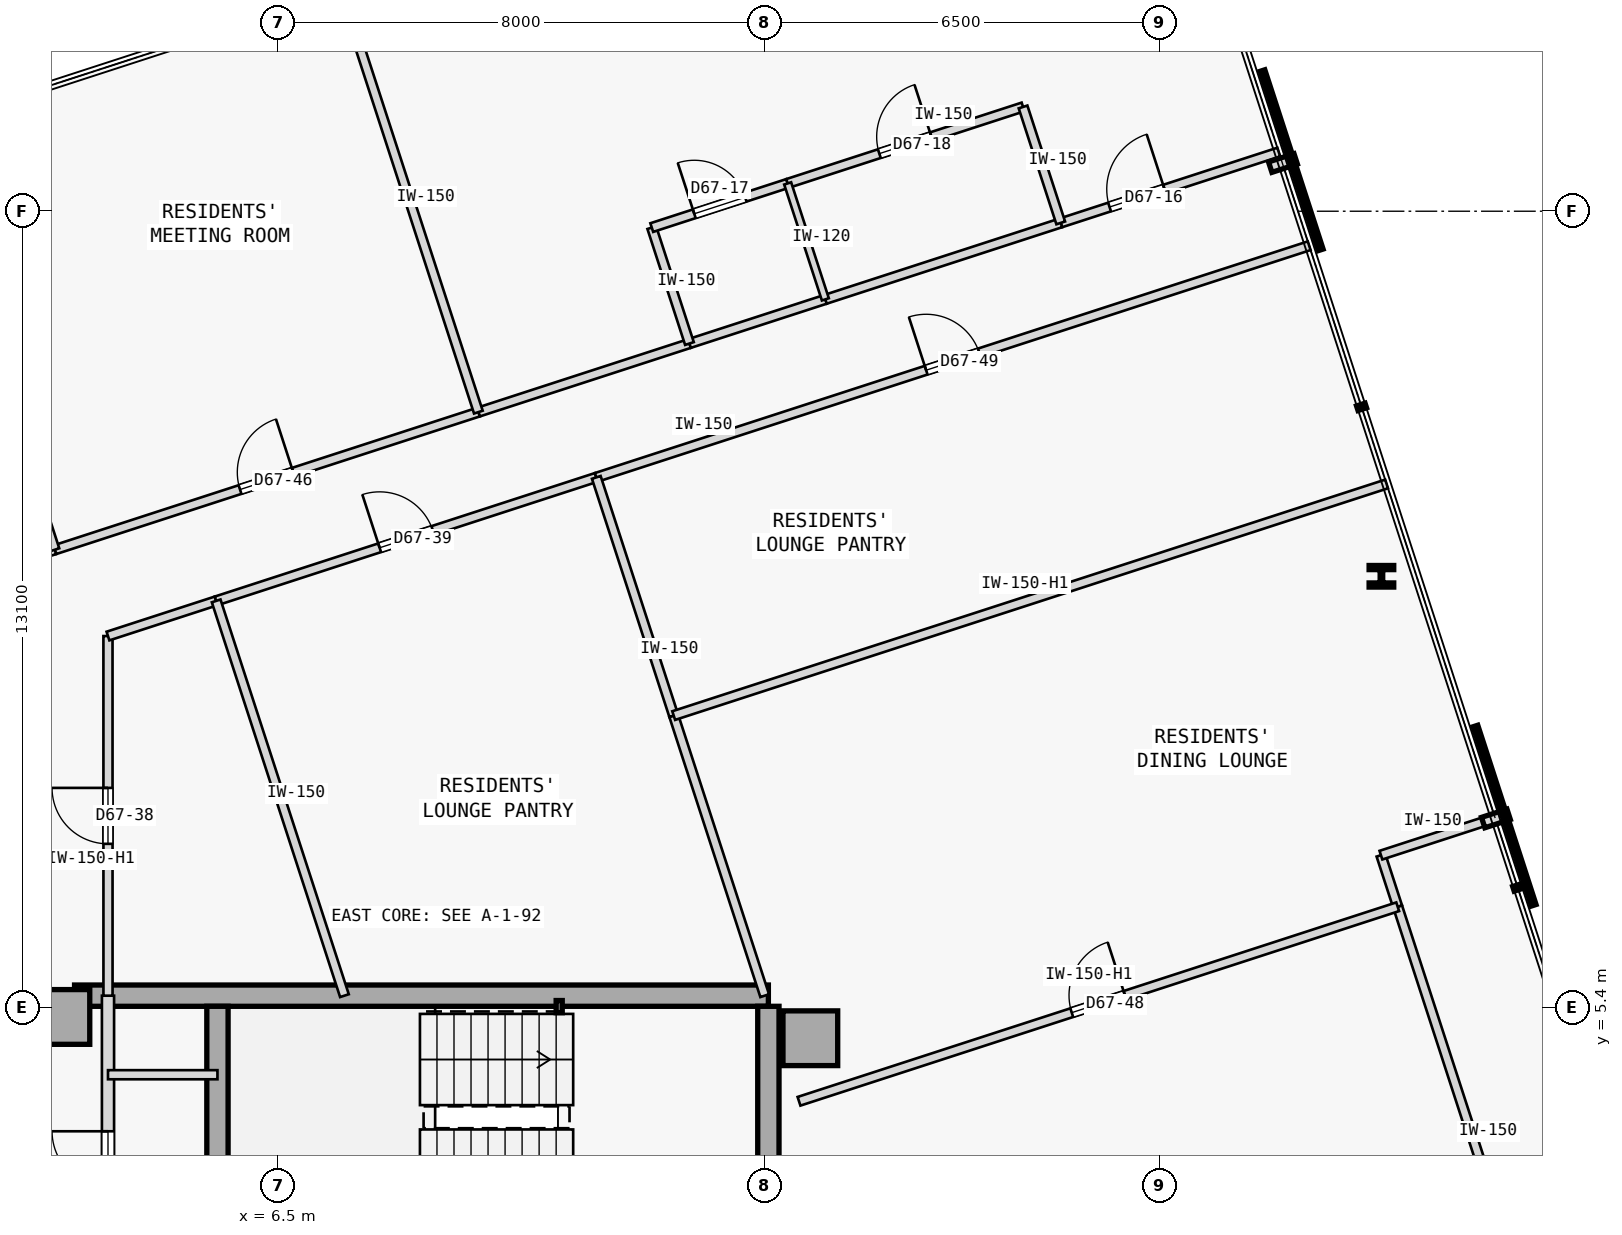
"""IFC4 building model, lengths in metres.
Left out: names, types, materials, properties, quantities, classifications, styles, units other than length and angle.
Written with IfcOpenShell. Run it as: python <this file> out.ifc"""

import sys

from ifc_helpers import new_model, si_unit, direction, frame, frame_2d, origin, origin_2d, place, context, subcontext, project, spatial, rectangle, hollow_rectangle, i_section, extrude, element, fill, save


model = new_model("IFC4")
c1 = context("Model", 3, precision=1e-05, world=origin(), true_north=direction((0.0, 1.0)))
c2 = subcontext(c1, "Body", "Model", "MODEL_VIEW")
j1 = project(units=[si_unit("LENGTHUNIT", "METRE"), si_unit("PLANEANGLEUNIT", "RADIAN")], contexts=[c1])
p1 = place(None, origin())
s1 = spatial("IfcSite", under=j1, at=p1, CompositionType="ELEMENT")
p2 = place(p1, origin())
s2 = spatial("IfcBuilding", under=s1, at=p2, CompositionType="ELEMENT")
p3 = place(p2, frame((0.0, 0.0, 251.1)))
s3 = spatial("IfcBuildingStorey", under=s2, at=p3, CompositionType="ELEMENT", Elevation=251.1)
for number, where, z_axis, x_axis in (
    (1, (15.25, 4.9, 0.0), (0.0, 0.0, 1.0), (1.0, 0.0, 0.0)),
    (2, (2.95, 5.25, 0.0), (0.0, 0.0, 1.0), (1.0, 0.0, 0.0)),
):
    element("IfcColumn", number, at=place(p3, frame(where, z_axis=z_axis, x_axis=x_axis)), inside=s3, PredefinedType="COLUMN", context=c2, shape_type="SweptSolid", body=[
        extrude(rectangle(XDim=0.9, YDim=0.9, at=origin_2d()), origin(), (0.0, 0.0, 1.0), 3.35),
    ])
p4 = place(p3, frame((3.15, 5.6, 0.0), z_axis=(0.0, 0.0, 1.0), x_axis=(1.0, 0.0, 0.0)))
e3 = element("IfcWall", 3, at=p4, inside=s3, PredefinedType="SHEAR", context=c2, shape_type="SweptSolid", body=[
    extrude(rectangle(XDim=11.41, YDim=0.35, at=frame_2d((5.705, 0.0))), origin(), (0.0, 0.0, 1.0), 2.95),
])
p5 = place(p3, frame((14.56, -5.425, 0.0), z_axis=(0.0, 0.0, 1.0), x_axis=(0.0, 1.0, 0.0)))
e4 = element("IfcWall", 4, at=p5, inside=s3, PredefinedType="SHEAR", context=c2, shape_type="SweptSolid", body=[
    extrude(rectangle(XDim=10.85, YDim=0.35, at=frame_2d((5.425, 0.0))), origin(), (0.0, 0.0, 1.0), 2.95),
])
p6 = place(p3, frame((5.5, 2.15, 0.0), z_axis=(0.0, 0.0, 1.0), x_axis=(0.0, 1.0, 0.0)))
e5 = element("IfcWall", 5, at=p6, inside=s3, PredefinedType="SHEAR", context=c2, shape_type="SweptSolid", body=[
    extrude(rectangle(XDim=3.275, YDim=0.35, at=frame_2d((1.638, 0.0))), origin(), (0.0, 0.0, 1.0), 2.95),
])
p7 = place(p3, frame((11.12, 5.42, 0.0), z_axis=(0.0, 0.0, 1.0), x_axis=(1.0, 0.0, 0.0)))
e6 = element("IfcColumn", 6, at=p7, inside=s3, PredefinedType="COLUMN", context=c2, shape_type="SweptSolid", body=[
    extrude(hollow_rectangle(XDim=0.1, YDim=0.2, WallThickness=0.008, at=origin_2d()), origin(), (0.0, 0.0, 1.0), 3.35),
])
p8 = place(p3, frame((24.642, 12.497, 0.0), z_axis=(0.0, 0.0, 1.0), x_axis=(1.0, 0.0, 0.0)))
e7 = element("IfcColumn", 7, at=p8, inside=s3, PredefinedType="COLUMN", context=c2, shape_type="SweptSolid", body=[
    extrude(i_section(OverallWidth=0.405, OverallDepth=0.355, WebThickness=0.042, FlangeThickness=0.068, FilletRadius=0.015, at=origin_2d()), origin(), (0.0, 0.0, 1.0), 3.35),
])
p9 = place(p3, frame((3.7, -1.15, 0.0), z_axis=(0.0, 0.0, 1.0), x_axis=(0.0, 1.0, 0.0)))
e8 = element("IfcWall", 8, at=p9, inside=s3, PredefinedType="STANDARD", context=c2, shape_type="SweptSolid", body=[
    extrude(rectangle(XDim=6.75, YDim=0.2, at=frame_2d((3.375, 0.0))), origin(), (0.0, 0.0, 1.0), 2.95),
])
p10 = place(p9, frame((3.6, 0.0, 0.0)))
e9 = element("IfcOpeningElement", 9, at=p10, cuts=e8, PredefinedType="OPENING", context=c2, shape_type="SweptSolid", body=[
    extrude(rectangle(XDim=0.92, YDim=2.15, at=frame_2d((0.46, 1.075))), frame((0.0, 0.11, 0.0), z_axis=(0.0, -1.0, 0.0), x_axis=(1.0, 0.0, 0.0)), (0.0, 0.0, 1.0), 0.22),
])
p11 = place(p9, frame((0.85, 0.0, 0.0)))
e10 = element("IfcOpeningElement", 10, at=p11, cuts=e8, PredefinedType="OPENING", context=c2, shape_type="SweptSolid", body=[
    extrude(rectangle(XDim=0.9, YDim=2.15, at=frame_2d((0.45, 1.075))), frame((0.0, 0.11, 0.0), z_axis=(0.0, -1.0, 0.0), x_axis=(1.0, 0.0, 0.0)), (0.0, 0.0, 1.0), 0.22),
])
p12 = place(p3, frame((3.7, 4.3, 0.0), z_axis=(0.0, 0.0, 1.0), x_axis=(1.0, 0.0, 0.0)))
e11 = element("IfcWall", 11, at=p12, inside=s3, PredefinedType="PARTITIONING", context=c2, shape_type="SweptSolid", body=[
    extrude(rectangle(XDim=1.8, YDim=0.15, at=frame_2d((0.9, 0.0))), origin(), (0.0, 0.0, 1.0), 2.95),
])
p13 = place(p3, frame((9.791, 15.196, 0.0), z_axis=(0.0, 0.0, 1.0), x_axis=(0.951050780541, 0.309034646652, 0.0)))
e12 = element("IfcWall", 12, at=p13, inside=s3, PredefinedType="PARTITIONING", context=c2, shape_type="SweptSolid", body=[
    extrude(rectangle(XDim=3.65, YDim=0.15, at=frame_2d((1.825, 0.0))), origin(), (0.0, 0.0, 1.0), 2.95),
])
p14 = place(p3, frame((19.368, 18.308, 0.0), z_axis=(0.0, 0.0, 1.0), x_axis=(0.951052151329, 0.309030428036, 0.0)))
e13 = element("IfcWall", 13, at=p14, inside=s3, PredefinedType="PARTITIONING", context=c2, shape_type="SweptSolid", body=[
    extrude(rectangle(XDim=3.77, YDim=0.15, at=frame_2d((1.885, 0.0))), origin(), (0.0, 0.0, 1.0), 2.95),
])
p15 = place(p14, frame((0.844, 0.0, 0.0)))
e14 = element("IfcOpeningElement", 14, at=p15, cuts=e13, PredefinedType="OPENING", context=c2, shape_type="SweptSolid", body=[
    extrude(rectangle(XDim=0.95, YDim=2.15, at=frame_2d((0.475, 1.075))), frame((0.0, 0.085, 0.0), z_axis=(0.0, -1.0, 0.0), x_axis=(1.0, 0.0, 0.0)), (0.0, 0.0, 1.0), 0.17),
])
p16 = place(p3, frame((13.262, 16.324, 0.0), z_axis=(0.0, 0.0, 1.0), x_axis=(0.951045519245, 0.309050837767, 0.0)))
e15 = element("IfcWall", 15, at=p16, inside=s3, PredefinedType="PARTITIONING", context=c2, shape_type="SweptSolid", body=[
    extrude(rectangle(XDim=2.35, YDim=0.15, at=frame_2d((1.175, 0.0))), origin(), (0.0, 0.0, 1.0), 2.95),
])
p17 = place(p3, frame((15.497, 17.051, 0.0), z_axis=(0.0, 0.0, 1.0), x_axis=(0.951067124726, 0.308984343076, 0.0)))
e16 = element("IfcWall", 16, at=p17, inside=s3, PredefinedType="PARTITIONING", context=c2, shape_type="SweptSolid", body=[
    extrude(rectangle(XDim=4.07, YDim=0.15, at=frame_2d((2.035, 0.0))), origin(), (0.0, 0.0, 1.0), 2.95),
])
p18 = place(p3, frame((3.7, 5.6, 0.0), z_axis=(0.0, 0.0, 1.0), x_axis=(-0.000123839008, 0.999999992332, 0.0)))
e17 = element("IfcWall", 17, at=p18, inside=s3, PredefinedType="PARTITIONING", context=c2, shape_type="SweptSolid", body=[
    extrude(rectangle(XDim=5.914, YDim=0.15, at=frame_2d((2.957, 0.0))), origin(), (0.0, 0.0, 1.0), 2.5),
])
p19 = place(p18, frame((2.497, 0.0, 0.0)))
e18 = element("IfcOpeningElement", 18, at=p19, cuts=e17, PredefinedType="OPENING", context=c2, shape_type="SweptSolid", body=[
    extrude(rectangle(XDim=0.92, YDim=2.15, at=frame_2d((0.46, 1.075))), frame((0.0, 0.085, 0.0), z_axis=(0.0, -1.0, 0.0), x_axis=(1.0, 0.0, 0.0)), (0.0, 0.0, 1.0), 0.17),
])
p20 = place(p3, frame((3.699, 11.514, 0.0), z_axis=(0.0, 0.0, 1.0), x_axis=(0.951069540665, 0.308976906612, 0.0)))
e19 = element("IfcWall", 19, at=p20, inside=s3, PredefinedType="PARTITIONING", context=c2, shape_type="SweptSolid", body=[
    extrude(rectangle(XDim=1.871, YDim=0.15, at=frame_2d((0.936, 0.0))), origin(), (0.0, 0.0, 1.0), 2.95),
])
p21 = place(p3, frame((5.479, 12.092, 0.0), z_axis=(0.0, 0.0, 1.0), x_axis=(0.951051809397, 0.309031480343, 0.0)))
e20 = element("IfcWall", 20, at=p21, inside=s3, PredefinedType="PARTITIONING", context=c2, shape_type="SweptSolid", body=[
    extrude(rectangle(XDim=6.573, YDim=0.15, at=frame_2d((3.287, 0.0))), origin(), (0.0, 0.0, 1.0), 2.95),
])
p22 = place(p21, frame((2.826, 0.0, 0.0)))
e21 = element("IfcOpeningElement", 21, at=p22, cuts=e20, PredefinedType="OPENING", context=c2, shape_type="SweptSolid", body=[
    extrude(rectangle(XDim=0.92, YDim=2.15, at=frame_2d((0.46, 1.075))), frame((0.0, 0.085, 0.0), z_axis=(0.0, -1.0, 0.0), x_axis=(1.0, 0.0, 0.0)), (0.0, 0.0, 1.0), 0.17),
])
p23 = place(p3, frame((-1.089, 11.661, 0.0), z_axis=(0.0, 0.0, 1.0), x_axis=(0.951057158344, 0.309015018346, 0.0)))
e22 = element("IfcWall", 22, at=p23, inside=s3, PredefinedType="PARTITIONING", context=c2, shape_type="SweptSolid", body=[
    extrude(rectangle(XDim=4.118, YDim=0.15, at=frame_2d((2.059, 0.0))), origin(), (0.0, 0.0, 1.0), 2.95),
])
p24 = place(p23, frame((1.599, 0.0, 0.0)))
e23 = element("IfcOpeningElement", 23, at=p24, cuts=e22, PredefinedType="OPENING", context=c2, shape_type="SweptSolid", body=[
    extrude(rectangle(XDim=0.92, YDim=2.15, at=frame_2d((0.46, 1.075))), frame((0.0, 0.085, 0.0), z_axis=(0.0, -1.0, 0.0), x_axis=(1.0, 0.0, 0.0)), (0.0, 0.0, 1.0), 0.17),
])
p25 = place(p3, frame((2.827, 12.934, 0.0), z_axis=(0.0, 0.0, 1.0), x_axis=(0.951056608557, 0.309016710423, 0.0)))
e24 = element("IfcWall", 24, at=p25, inside=s3, PredefinedType="PARTITIONING", context=c2, shape_type="SweptSolid", body=[
    extrude(rectangle(XDim=7.322, YDim=0.15, at=frame_2d((3.661, 0.0))), origin(), (0.0, 0.0, 1.0), 2.95),
])
p26 = place(p25, frame((3.201, 0.0, 0.0)))
e25 = element("IfcOpeningElement", 25, at=p26, cuts=e24, PredefinedType="OPENING", context=c2, shape_type="SweptSolid", body=[
    extrude(rectangle(XDim=0.92, YDim=2.15, at=frame_2d((0.46, 1.075))), frame((0.0, 0.085, 0.0), z_axis=(0.0, -1.0, 0.0), x_axis=(1.0, 0.0, 0.0)), (0.0, 0.0, 1.0), 0.17),
])
p27 = place(p3, frame((27.637, -1.332, 0.0), z_axis=(0.0, 0.0, 1.0), x_axis=(-0.309040411618, 0.951048907253, 0.0)))
e26 = element("IfcWall", 26, at=p27, inside=s3, PredefinedType="PARTITIONING", context=c2, shape_type="SweptSolid", body=[
    extrude(rectangle(XDim=8.826, YDim=0.15, at=frame_2d((4.413, 0.0))), origin(), (0.0, 0.0, 1.0), 2.95),
])
p28 = place(p3, frame((24.909, 7.062, 0.0), z_axis=(0.0, 0.0, 1.0), x_axis=(-0.30899324298, 0.951064233263, 0.0)))
e27 = element("IfcWall", 27, at=p28, inside=s3, PredefinedType="PARTITIONING", context=c2, shape_type="SweptSolid", body=[
    extrude(rectangle(XDim=0.892, YDim=0.15, at=frame_2d((0.446, 0.0))), origin(), (0.0, 0.0, 1.0), 2.95),
])
p29 = place(p3, frame((24.634, 7.91, 0.0), z_axis=(0.0, 0.0, 1.0), x_axis=(0.951054051148, 0.309024581215, 0.0)))
e28 = element("IfcWall", 28, at=p29, inside=s3, PredefinedType="PARTITIONING", context=c2, shape_type="SweptSolid", body=[
    extrude(rectangle(XDim=1.975, YDim=0.15, at=frame_2d((0.988, 0.0))), origin(), (0.0, 0.0, 1.0), 2.95),
])
p30 = place(p3, frame((11.73, 14.123, 0.0), z_axis=(0.0, 0.0, 1.0), x_axis=(0.951060263663, 0.309005460926, 0.0)))
e29 = element("IfcWall", 29, at=p30, inside=s3, PredefinedType="PARTITIONING", context=c2, shape_type="SweptSolid", body=[
    extrude(rectangle(XDim=12.327, YDim=0.15, at=frame_2d((6.164, 0.0))), origin(), (0.0, 0.0, 1.0), 2.95),
])
p31 = place(p30, frame((5.704, 0.0, 0.0)))
e30 = element("IfcOpeningElement", 30, at=p31, cuts=e29, PredefinedType="OPENING", context=c2, shape_type="SweptSolid", body=[
    extrude(rectangle(XDim=0.92, YDim=2.15, at=frame_2d((0.46, 1.075))), frame((0.0, 0.085, 0.0), z_axis=(0.0, -1.0, 0.0), x_axis=(1.0, 0.0, 0.0)), (0.0, 0.0, 1.0), 0.17),
])
p32 = place(p3, frame((13.262, 16.324, 0.0), z_axis=(0.0, 0.0, 1.0), x_axis=(-0.309022749039, 0.951054646472, 0.0)))
e31 = element("IfcWall", 31, at=p32, inside=s3, PredefinedType="PARTITIONING", context=c2, shape_type="SweptSolid", body=[
    extrude(rectangle(XDim=2.005, YDim=0.15, at=frame_2d((1.002, 0.0))), origin(), (0.0, 0.0, 1.0), 2.95),
])
p33 = place(p3, frame((12.642, 18.231, 0.0), z_axis=(0.0, 0.0, 1.0), x_axis=(0.951076048914, 0.308956872689, 0.0)))
e32 = element("IfcWall", 32, at=p33, inside=s3, PredefinedType="PARTITIONING", context=c2, shape_type="SweptSolid", body=[
    extrude(rectangle(XDim=2.35, YDim=0.15, at=frame_2d((1.175, 0.0))), origin(), (0.0, 0.0, 1.0), 2.95),
])
p34 = place(p33, frame((0.735, 0.0, 0.0)))
e33 = element("IfcOpeningElement", 33, at=p34, cuts=e32, PredefinedType="OPENING", context=c2, shape_type="SweptSolid", body=[
    extrude(rectangle(XDim=0.88, YDim=2.15, at=frame_2d((0.44, 1.075))), frame((0.0, 0.085, 0.0), z_axis=(0.0, -1.0, 0.0), x_axis=(1.0, 0.0, 0.0)), (0.0, 0.0, 1.0), 0.17),
])
p35 = place(p3, frame((14.877, 18.957, 0.0), z_axis=(0.0, 0.0, 1.0), x_axis=(0.95104949593, 0.309038600002, 0.0)))
e34 = element("IfcWall", 34, at=p35, inside=s3, PredefinedType="PARTITIONING", context=c2, shape_type="SweptSolid", body=[
    extrude(rectangle(XDim=4.07, YDim=0.15, at=frame_2d((2.035, 0.0))), origin(), (0.0, 0.0, 1.0), 2.95),
])
p36 = place(p35, frame((1.585, 0.0, 0.0)))
e35 = element("IfcOpeningElement", 35, at=p36, cuts=e34, PredefinedType="OPENING", context=c2, shape_type="SweptSolid", body=[
    extrude(rectangle(XDim=0.9, YDim=2.15, at=frame_2d((0.45, 1.075))), frame((0.0, 0.085, 0.0), z_axis=(0.0, -1.0, 0.0), x_axis=(1.0, 0.0, 0.0)), (0.0, 0.0, 1.0), 0.17),
])
p37 = place(p3, frame((19.368, 18.308, 0.0), z_axis=(0.0, 0.0, 1.0), x_axis=(-0.309022749039, 0.951054646472, 0.0)))
e36 = element("IfcWall", 36, at=p37, inside=s3, PredefinedType="PARTITIONING", context=c2, shape_type="SweptSolid", body=[
    extrude(rectangle(XDim=2.005, YDim=0.15, at=frame_2d((1.002, 0.0))), origin(), (0.0, 0.0, 1.0), 2.95),
])
p38 = place(p3, frame((9.791, 15.196, 0.0), z_axis=(0.0, 0.0, 1.0), x_axis=(-0.309029230739, 0.951052540372, 0.0)))
e37 = element("IfcWall", 37, at=p38, inside=s3, PredefinedType="PARTITIONING", context=c2, shape_type="SweptSolid", body=[
    extrude(rectangle(XDim=7.284, YDim=0.15, at=frame_2d((3.642, 0.0))), origin(), (0.0, 0.0, 1.0), 2.95),
])
p39 = place(p3, frame((15.497, 17.051, 0.0), z_axis=(0.0, 0.0, 1.0), x_axis=(-0.309058537449, 0.951043017129, 0.0)))
e38 = element("IfcWall", 38, at=p39, inside=s3, PredefinedType="PARTITIONING", context=c2, shape_type="SweptSolid", body=[
    extrude(rectangle(XDim=2.005, YDim=0.12, at=frame_2d((1.002, 0.0))), origin(), (0.0, 0.0, 1.0), 2.95),
])
p40 = place(p3, frame((7.588, 5.6, 0.0), z_axis=(0.0, 0.0, 1.0), x_axis=(-0.309018946982, 0.951055881852, 0.0)))
e39 = element("IfcWall", 39, at=p40, inside=s3, PredefinedType="PARTITIONING", context=c2, shape_type="SweptSolid", body=[
    extrude(rectangle(XDim=6.826, YDim=0.15, at=frame_2d((3.413, 0.0))), origin(), (0.0, 0.0, 1.0), 2.95),
])
p41 = place(p3, frame((14.5, 5.6, 0.0), z_axis=(0.0, 0.0, 1.0), x_axis=(-0.308974360462, 0.951070367837, 0.0)))
e40 = element("IfcWall", 40, at=p41, inside=s3, PredefinedType="PARTITIONING", context=c2, shape_type="SweptSolid", body=[
    extrude(rectangle(XDim=4.843, YDim=0.15, at=frame_2d((2.421, 0.0))), origin(), (0.0, 0.0, 1.0), 2.95),
])
p42 = place(p3, frame((13.003, 10.206, 0.0), z_axis=(0.0, 0.0, 1.0), x_axis=(-0.309035144366, 0.951050618814, 0.0)))
e41 = element("IfcWall", 41, at=p42, inside=s3, PredefinedType="PARTITIONING", context=c2, shape_type="SweptSolid", body=[
    extrude(rectangle(XDim=4.119, YDim=0.15, at=frame_2d((2.06, 0.0))), origin(), (0.0, 0.0, 1.0), 2.95),
])
p43 = place(p3, frame((2.827, 12.934, 0.0), z_axis=(0.0, 0.0, 1.0), x_axis=(-0.308998913866, 0.951062390819, 0.0)))
e42 = element("IfcWall", 42, at=p43, inside=s3, PredefinedType="PARTITIONING", context=c2, shape_type="SweptSolid", body=[
    extrude(rectangle(XDim=7.284, YDim=0.15, at=frame_2d((3.642, 0.0))), origin(), (0.0, 0.0, 1.0), 2.95),
])
p44 = place(p3, frame((15.064, 3.863, 0.0), z_axis=(0.0, 0.0, 1.0), x_axis=(0.951061448945, 0.309001812827, 0.0)))
e43 = element("IfcWall", 43, at=p44, inside=s3, PredefinedType="PARTITIONING", context=c2, shape_type="SweptSolid", body=[
    extrude(rectangle(XDim=10.352, YDim=0.15, at=frame_2d((5.176, 0.0))), origin(), (0.0, 0.0, 1.0), 2.5),
])
p45 = place(p44, frame((4.716, 0.0, 0.0)))
e44 = element("IfcOpeningElement", 44, at=p45, cuts=e43, PredefinedType="OPENING", context=c2, shape_type="SweptSolid", body=[
    extrude(rectangle(XDim=0.92, YDim=2.15, at=frame_2d((0.46, 1.075))), frame((0.0, 0.085, 0.0), z_axis=(0.0, -1.0, 0.0), x_axis=(1.0, 0.0, 0.0)), (0.0, 0.0, 1.0), 0.17),
])
p46 = place(p3, frame((13.003, 10.206, 0.0), z_axis=(0.0, 0.0, 1.0), x_axis=(0.951060263663, 0.309005460926, 0.0)))
e45 = element("IfcWall", 45, at=p46, inside=s3, PredefinedType="PARTITIONING", context=c2, shape_type="SweptSolid", body=[
    extrude(rectangle(XDim=12.327, YDim=0.15, at=frame_2d((6.164, 0.0))), origin(), (0.0, 0.0, 1.0), 2.5),
])
p47 = place(p10, origin())
e46 = element("IfcDoor", 46, at=p47, inside=s3, OperationType="SINGLE_SWING_RIGHT", PredefinedType="DOOR", context=c2, shape_type="SweptSolid", body=[
    extrude(rectangle(XDim=0.92, YDim=2.15, at=frame_2d((0.46, 1.075))), frame((0.0, 0.025, 0.0), z_axis=(0.0, -1.0, 0.0), x_axis=(1.0, 0.0, 0.0)), (0.0, 0.0, 1.0), 0.05),
])
fill(e9, e46)
p48 = place(p15, origin())
e47 = element("IfcDoor", 47, at=p48, inside=s3, OperationType="SINGLE_SWING_RIGHT", PredefinedType="DOOR", context=c2, shape_type="SweptSolid", body=[
    extrude(rectangle(XDim=0.95, YDim=2.15, at=frame_2d((0.475, 1.075))), frame((0.0, 0.025, 0.0), z_axis=(0.0, -1.0, 0.0), x_axis=(1.0, 0.0, 0.0)), (0.0, 0.0, 1.0), 0.05),
])
fill(e14, e47)
p49 = place(p34, origin())
e48 = element("IfcDoor", 48, at=p49, inside=s3, OperationType="SINGLE_SWING_LEFT", PredefinedType="DOOR", context=c2, shape_type="SweptSolid", body=[
    extrude(rectangle(XDim=0.88, YDim=2.15, at=frame_2d((0.44, 1.075))), frame((0.0, 0.025, 0.0), z_axis=(0.0, -1.0, 0.0), x_axis=(1.0, 0.0, 0.0)), (0.0, 0.0, 1.0), 0.05),
])
fill(e33, e48)
p50 = place(p36, origin())
e49 = element("IfcDoor", 49, at=p50, inside=s3, OperationType="SINGLE_SWING_RIGHT", PredefinedType="DOOR", context=c2, shape_type="SweptSolid", body=[
    extrude(rectangle(XDim=0.9, YDim=2.15, at=frame_2d((0.45, 1.075))), frame((0.0, 0.025, 0.0), z_axis=(0.0, -1.0, 0.0), x_axis=(1.0, 0.0, 0.0)), (0.0, 0.0, 1.0), 0.05),
])
fill(e35, e49)
p51 = place(p19, origin())
e50 = element("IfcDoor", 50, at=p51, inside=s3, OperationType="SINGLE_SWING_RIGHT", PredefinedType="DOOR", context=c2, shape_type="SweptSolid", body=[
    extrude(rectangle(XDim=0.92, YDim=2.15, at=frame_2d((0.46, 1.075))), frame((0.0, 0.025, 0.0), z_axis=(0.0, -1.0, 0.0), x_axis=(1.0, 0.0, 0.0)), (0.0, 0.0, 1.0), 0.05),
])
fill(e18, e50)
p52 = place(p22, origin())
e51 = element("IfcDoor", 51, at=p52, inside=s3, OperationType="SINGLE_SWING_LEFT", PredefinedType="DOOR", context=c2, shape_type="SweptSolid", body=[
    extrude(rectangle(XDim=0.92, YDim=2.15, at=frame_2d((0.46, 1.075))), frame((0.0, 0.025, 0.0), z_axis=(0.0, -1.0, 0.0), x_axis=(1.0, 0.0, 0.0)), (0.0, 0.0, 1.0), 0.05),
])
fill(e21, e51)
p53 = place(p26, origin())
e52 = element("IfcDoor", 52, at=p53, inside=s3, OperationType="SINGLE_SWING_RIGHT", PredefinedType="DOOR", context=c2, shape_type="SweptSolid", body=[
    extrude(rectangle(XDim=0.92, YDim=2.15, at=frame_2d((0.46, 1.075))), frame((0.0, 0.025, 0.0), z_axis=(0.0, -1.0, 0.0), x_axis=(1.0, 0.0, 0.0)), (0.0, 0.0, 1.0), 0.05),
])
fill(e25, e52)
p54 = place(p45, origin())
e53 = element("IfcDoor", 53, at=p54, inside=s3, OperationType="SINGLE_SWING_RIGHT", PredefinedType="DOOR", context=c2, shape_type="SweptSolid", body=[
    extrude(rectangle(XDim=0.92, YDim=2.15, at=frame_2d((0.46, 1.075))), frame((0.0, 0.025, 0.0), z_axis=(0.0, -1.0, 0.0), x_axis=(1.0, 0.0, 0.0)), (0.0, 0.0, 1.0), 0.05),
])
fill(e44, e53)
p55 = place(p31, origin())
e54 = element("IfcDoor", 54, at=p55, inside=s3, OperationType="SINGLE_SWING_LEFT", PredefinedType="DOOR", context=c2, shape_type="SweptSolid", body=[
    extrude(rectangle(XDim=0.92, YDim=2.15, at=frame_2d((0.46, 1.075))), frame((0.0, 0.025, 0.0), z_axis=(0.0, -1.0, 0.0), x_axis=(1.0, 0.0, 0.0)), (0.0, 0.0, 1.0), 0.05),
])
fill(e30, e54)
save(model, sys.argv[1])
